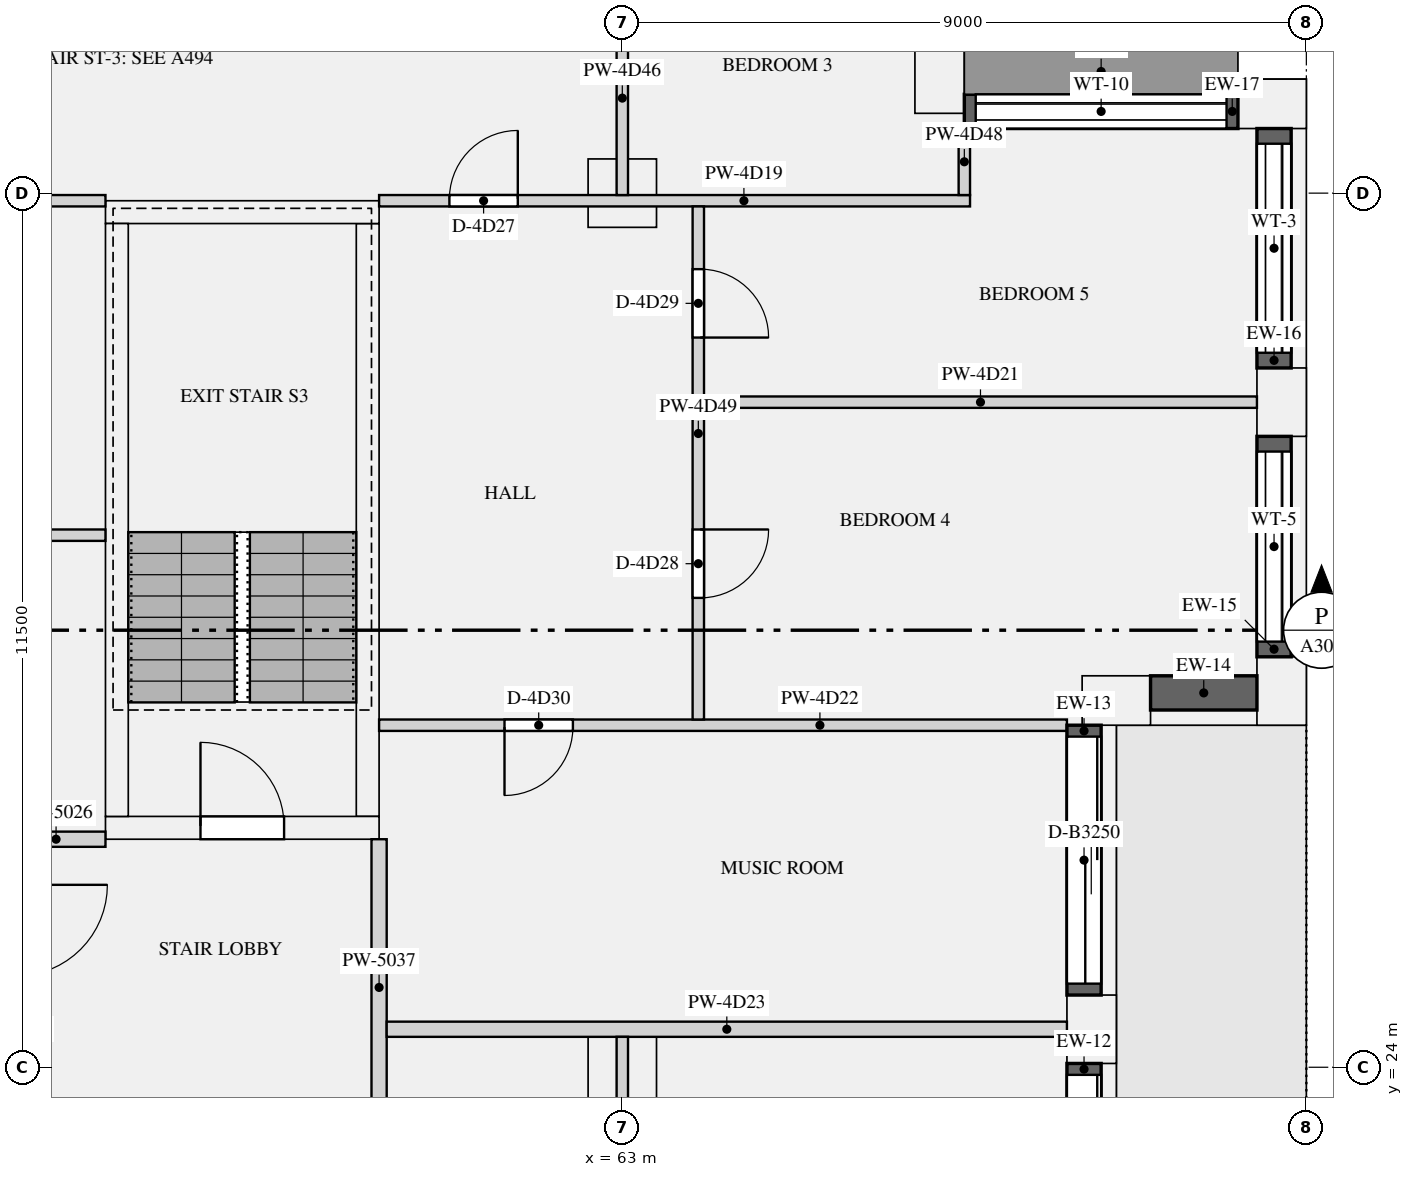
"""IFC4 building model, lengths in metres.
Left out: names, types, materials, properties, quantities, classifications, styles, units other than length and angle.
Written with IfcOpenShell. Run it as: python <this file> out.ifc"""

import sys

from ifc_helpers import new_model, si_unit, direction, frame, frame_2d, origin, origin_2d, place, context, subcontext, project, spatial, rectangle, extrude, element, fill, save


model = new_model("IFC4")
c1 = context("Model", 3, precision=1e-05, world=origin(), true_north=direction((0.0, 1.0)))
c2 = subcontext(c1, "Body", "Model", "MODEL_VIEW")
j1 = project(units=[si_unit("LENGTHUNIT", "METRE"), si_unit("PLANEANGLEUNIT", "RADIAN")], contexts=[c1])
p1 = place(None, origin())
s1 = spatial("IfcSite", under=j1, at=p1, CompositionType="ELEMENT")
p2 = place(p1, origin())
s2 = spatial("IfcBuilding", under=s1, at=p2, CompositionType="ELEMENT")
p3 = place(p2, frame((0.0, 0.0, 223.2)))
s3 = spatial("IfcBuildingStorey", under=s2, at=p3, CompositionType="ELEMENT", Elevation=223.2)
for number, where, z_axis, x_axis in (
    (1, (69.175, 24.5, 0.0), (0.0, 0.0, 1.0), (0.0, 1.0, 0.0)),
    (2, (69.5, 28.825, 0.0), (0.0, 0.0, 1.0), (1.0, 0.0, 0.0)),
    (3, (71.675, 28.95, 0.0), (0.0, 0.0, 1.0), (0.0, 1.0, 0.0)),
    (4, (71.675, 32.75, 0.0), (0.0, 0.0, 1.0), (0.0, 1.0, 0.0)),
    (5, (71.55, 36.675, 0.0), (0.0, 0.0, 1.0), (-1.0, 0.0, 0.0)),
    (6, (67.175, 37.0, 0.0), (0.0, 0.0, 1.0), (0.0, 1.0, 0.0)),
):
    element("IfcColumn", number, at=place(p3, frame(where, z_axis=z_axis, x_axis=x_axis)), inside=s3, PredefinedType="USERDEFINED", context=c2, shape_type="SweptSolid", body=[
        extrude(rectangle(XDim=0.9, YDim=0.65, at=origin_2d()), origin(), (0.0, 0.0, 1.0), 3.15),
    ])
for number, where, z_axis, x_axis in (
    (7, (63.0, 24.0, 0.0), (0.0, 0.0, 1.0), (1.0, 0.0, 0.0)),
    (8, (63.0, 35.5, 0.0), (0.0, 0.0, 1.0), (1.0, 0.0, 0.0)),
):
    element("IfcColumn", number, at=place(p3, frame(where, z_axis=z_axis, x_axis=x_axis)), inside=s3, PredefinedType="COLUMN", context=c2, shape_type="SweptSolid", body=[
        extrude(rectangle(XDim=0.9, YDim=0.9, at=origin_2d()), origin(), (0.0, 0.0, 1.0), 3.15),
    ])
p4 = place(p3, frame((56.2, 27.15, 0.0), z_axis=(0.0, 0.0, 1.0), x_axis=(1.0, 0.0, 0.0)))
e9 = element("IfcWall", 9, at=p4, inside=s3, PredefinedType="SHEAR", context=c2, shape_type="SweptSolid", body=[
    extrude(rectangle(XDim=3.6, YDim=0.3, at=frame_2d((1.8, 0.0))), origin(), (0.0, 0.0, 1.0), 3.15),
])
p5 = place(p4, frame((1.25, 0.0, 0.0)))
e10 = element("IfcOpeningElement", 10, at=p5, cuts=e9, PredefinedType="OPENING", context=c2, shape_type="SweptSolid", body=[
    extrude(rectangle(XDim=1.1, YDim=2.1, at=frame_2d((0.55, 1.05))), frame((0.0, 0.16, 0.0), z_axis=(0.0, -1.0, 0.0), x_axis=(1.0, 0.0, 0.0)), (0.0, 0.0, 1.0), 0.32),
])
p6 = place(p3, frame((56.2, 35.25, 0.0), z_axis=(0.0, 0.0, 1.0), x_axis=(1.0, 0.0, 0.0)))
e11 = element("IfcWall", 11, at=p6, inside=s3, PredefinedType="SHEAR", context=c2, shape_type="SweptSolid", body=[
    extrude(rectangle(XDim=3.6, YDim=0.3, at=frame_2d((1.8, 0.0))), origin(), (0.0, 0.0, 1.0), 3.15),
])
for number, where, z_axis, x_axis in (
    (12, (56.35, 27.3, 0.0), (0.0, 0.0, 1.0), (0.0, 1.0, 0.0)),
    (13, (59.65, 27.3, 0.0), (0.0, 0.0, 1.0), (0.0, 1.0, 0.0)),
):
    element("IfcWall", number, at=place(p3, frame(where, z_axis=z_axis, x_axis=x_axis)), inside=s3, PredefinedType="SHEAR", context=c2, shape_type="SweptSolid", body=[
        extrude(rectangle(XDim=7.8, YDim=0.3, at=frame_2d((3.9, 0.0))), origin(), (0.0, 0.0, 1.0), 3.15),
    ])
p7 = place(p3, frame((69.075, 20.95, 0.0), z_axis=(0.0, 0.0, 1.0), x_axis=(0.0, 1.0, 0.0)))
e14 = element("IfcWall", 14, at=p7, inside=s3, PredefinedType="SOLIDWALL", context=c2, shape_type="SweptSolid", body=[
    extrude(rectangle(XDim=3.1, YDim=0.45, at=frame_2d((1.55, 0.0))), origin(), (0.0, 0.0, 1.0), 2.83),
])
p8 = place(p7, frame((0.15, 0.0, 0.0)))
e15 = element("IfcOpeningElement", 15, at=p8, cuts=e14, PredefinedType="OPENING", context=c2, shape_type="SweptSolid", body=[
    extrude(rectangle(XDim=2.8, YDim=2.3, at=frame_2d((1.4, 1.15))), frame((0.0, 0.235, 0.0), z_axis=(0.0, -1.0, 0.0), x_axis=(1.0, 0.0, 0.0)), (0.0, 0.0, 1.0), 0.47),
])
p9 = place(p3, frame((69.075, 24.95, 0.0), z_axis=(0.0, 0.0, 1.0), x_axis=(0.0, 1.0, 0.0)))
e16 = element("IfcWall", 16, at=p9, inside=s3, PredefinedType="SOLIDWALL", context=c2, shape_type="SweptSolid", body=[
    extrude(rectangle(XDim=3.55, YDim=0.45, at=frame_2d((1.775, 0.0))), origin(), (0.0, 0.0, 1.0), 2.83),
])
p10 = place(p9, frame((0.15, 0.0, 0.0)))
e17 = element("IfcOpeningElement", 17, at=p10, cuts=e16, PredefinedType="OPENING", context=c2, shape_type="SweptSolid", body=[
    extrude(rectangle(XDim=3.25, YDim=2.3, at=frame_2d((1.625, 1.15))), frame((0.0, 0.235, 0.0), z_axis=(0.0, -1.0, 0.0), x_axis=(1.0, 0.0, 0.0)), (0.0, 0.0, 1.0), 0.47),
])
p11 = place(p3, frame((69.95, 28.925, 0.9), z_axis=(0.0, 0.0, 1.0), x_axis=(1.0, 0.0, 0.0)))
e18 = element("IfcWall", 18, at=p11, inside=s3, PredefinedType="SOLIDWALL", context=c2, shape_type="SweptSolid", body=[
    extrude(rectangle(XDim=1.4, YDim=0.45, at=frame_2d((0.7, 0.0))), origin(), (0.0, 0.0, 1.0), 1.93),
])
p12 = place(p3, frame((71.575, 29.4, 0.9), z_axis=(0.0, 0.0, 1.0), x_axis=(0.0, 1.0, 0.0)))
e19 = element("IfcWall", 19, at=p12, inside=s3, PredefinedType="SOLIDWALL", context=c2, shape_type="SweptSolid", body=[
    extrude(rectangle(XDim=2.9, YDim=0.45, at=frame_2d((1.45, 0.0))), origin(), (0.0, 0.0, 1.0), 1.93),
])
p13 = place(p12, frame((0.2, 0.0, 0.15)))
e20 = element("IfcOpeningElement", 20, at=p13, cuts=e19, PredefinedType="OPENING", context=c2, shape_type="SweptSolid", body=[
    extrude(rectangle(XDim=2.5, YDim=1.5, at=frame_2d((1.25, 0.75))), frame((0.0, 0.235, 0.0), z_axis=(0.0, -1.0, 0.0), x_axis=(1.0, 0.0, 0.0)), (0.0, 0.0, 1.0), 0.47),
])
p14 = place(p3, frame((71.575, 33.2, 0.9), z_axis=(0.0, 0.0, 1.0), x_axis=(0.0, 1.0, 0.0)))
e21 = element("IfcWall", 21, at=p14, inside=s3, PredefinedType="SOLIDWALL", context=c2, shape_type="SweptSolid", body=[
    extrude(rectangle(XDim=3.15, YDim=0.45, at=frame_2d((1.575, 0.0))), origin(), (0.0, 0.0, 1.0), 1.93),
])
p15 = place(p14, frame((0.2, 0.0, 0.15)))
e22 = element("IfcOpeningElement", 22, at=p15, cuts=e21, PredefinedType="OPENING", context=c2, shape_type="SweptSolid", body=[
    extrude(rectangle(XDim=2.75, YDim=1.5, at=frame_2d((1.375, 0.75))), frame((0.0, 0.235, 0.0), z_axis=(0.0, -1.0, 0.0), x_axis=(1.0, 0.0, 0.0)), (0.0, 0.0, 1.0), 0.47),
])
p16 = place(p3, frame((71.1, 36.575, 0.9), z_axis=(0.0, 0.0, 1.0), x_axis=(-1.0, 0.0, 0.0)))
e23 = element("IfcWall", 23, at=p16, inside=s3, PredefinedType="SOLIDWALL", context=c2, shape_type="SweptSolid", body=[
    extrude(rectangle(XDim=3.6, YDim=0.45, at=frame_2d((1.8, 0.0))), origin(), (0.0, 0.0, 1.0), 1.93),
])
p17 = place(p16, frame((0.15, 0.0, 0.15)))
e24 = element("IfcOpeningElement", 24, at=p17, cuts=e23, PredefinedType="OPENING", context=c2, shape_type="SweptSolid", body=[
    extrude(rectangle(XDim=3.3, YDim=1.5, at=frame_2d((1.65, 0.75))), frame((0.0, 0.235, 0.0), z_axis=(0.0, -1.0, 0.0), x_axis=(1.0, 0.0, 0.0)), (0.0, 0.0, 1.0), 0.47),
])
p18 = place(p3, frame((54.9, 27.0, 0.0), z_axis=(0.0, 0.0, 1.0), x_axis=(1.0, 0.0, 0.0)))
e25 = element("IfcWall", 25, at=p18, inside=s3, PredefinedType="PARTITIONING", context=c2, shape_type="SweptSolid", body=[
    extrude(rectangle(XDim=1.3, YDim=0.2, at=frame_2d((0.65, 0.0))), origin(), (0.0, 0.0, 1.0), 2.83),
])
p19 = place(p3, frame((59.8, 23.1, 0.0), z_axis=(0.0, 0.0, 1.0), x_axis=(0.0, 1.0, 0.0)))
e26 = element("IfcWall", 26, at=p19, inside=s3, PredefinedType="PARTITIONING", context=c2, shape_type="SweptSolid", body=[
    extrude(rectangle(XDim=3.9, YDim=0.2, at=frame_2d((1.95, 0.0))), origin(), (0.0, 0.0, 1.0), 2.83),
])
p20 = place(p3, frame((48.075, 31.0, 0.0), z_axis=(0.0, 0.0, 1.0), x_axis=(1.0, 0.0, 0.0)))
e27 = element("IfcWall", 27, at=p20, inside=s3, PredefinedType="PARTITIONING", context=c2, shape_type="SweptSolid", body=[
    extrude(rectangle(XDim=8.125, YDim=0.15, at=frame_2d((4.062, 0.0))), origin(), (0.0, 0.0, 1.0), 2.83),
])
p21 = place(p20, frame((3.575, 0.0, 0.0)))
e28 = element("IfcOpeningElement", 28, at=p21, cuts=e27, PredefinedType="OPENING", context=c2, shape_type="SweptSolid", body=[
    extrude(rectangle(XDim=0.9, YDim=2.1, at=frame_2d((0.45, 1.05))), frame((0.0, 0.085, 0.0), z_axis=(0.0, -1.0, 0.0), x_axis=(1.0, 0.0, 0.0)), (0.0, 0.0, 1.0), 0.17),
])
p22 = place(p3, frame((45.0, 35.4, 0.0), z_axis=(0.0, 0.0, 1.0), x_axis=(1.0, 0.0, 0.0)))
e29 = element("IfcWall", 29, at=p22, inside=s3, PredefinedType="PARTITIONING", context=c2, shape_type="SweptSolid", body=[
    extrude(rectangle(XDim=11.2, YDim=0.15, at=frame_2d((5.6, 0.0))), origin(), (0.0, 0.0, 1.0), 2.83),
])
p23 = place(p22, frame((5.325, 0.0, 0.0)))
e30 = element("IfcOpeningElement", 30, at=p23, cuts=e29, PredefinedType="OPENING", context=c2, shape_type="SweptSolid", body=[
    extrude(rectangle(XDim=0.9, YDim=2.1, at=frame_2d((0.45, 1.05))), frame((0.0, 0.085, 0.0), z_axis=(0.0, -1.0, 0.0), x_axis=(1.0, 0.0, 0.0)), (0.0, 0.0, 1.0), 0.17),
])
p24 = place(p22, frame((0.975, 0.0, 0.0)))
e31 = element("IfcOpeningElement", 31, at=p24, cuts=e29, PredefinedType="OPENING", context=c2, shape_type="SweptSolid", body=[
    extrude(rectangle(XDim=1.5, YDim=2.1, at=frame_2d((0.75, 1.05))), frame((0.0, 0.085, 0.0), z_axis=(0.0, -1.0, 0.0), x_axis=(1.0, 0.0, 0.0)), (0.0, 0.0, 1.0), 0.17),
])
p25 = place(p3, frame((59.8, 35.4, 0.0), z_axis=(0.0, 0.0, 1.0), x_axis=(1.0, 0.0, 0.0)))
e32 = element("IfcWall", 32, at=p25, inside=s3, PredefinedType="PARTITIONING", context=c2, shape_type="SweptSolid", body=[
    extrude(rectangle(XDim=7.775, YDim=0.15, at=frame_2d((3.887, 0.0))), origin(), (0.0, 0.0, 1.0), 2.83),
])
p26 = place(p25, frame((0.925, 0.0, 0.0)))
e33 = element("IfcOpeningElement", 33, at=p26, cuts=e32, PredefinedType="OPENING", context=c2, shape_type="SweptSolid", body=[
    extrude(rectangle(XDim=0.9, YDim=2.1, at=frame_2d((0.45, 1.05))), frame((0.0, 0.085, 0.0), z_axis=(0.0, -1.0, 0.0), x_axis=(1.0, 0.0, 0.0)), (0.0, 0.0, 1.0), 0.17),
])
p27 = place(p3, frame((64.075, 32.75, 0.0), z_axis=(0.0, 0.0, 1.0), x_axis=(1.0, 0.0, 0.0)))
e34 = element("IfcWall", 34, at=p27, inside=s3, PredefinedType="PARTITIONING", context=c2, shape_type="SweptSolid", body=[
    extrude(rectangle(XDim=7.275, YDim=0.15, at=frame_2d((3.638, 0.0))), origin(), (0.0, 0.0, 1.0), 2.83),
])
p28 = place(p3, frame((59.8, 28.5, 0.0), z_axis=(0.0, 0.0, 1.0), x_axis=(1.0, 0.0, 0.0)))
e35 = element("IfcWall", 35, at=p28, inside=s3, PredefinedType="PARTITIONING", context=c2, shape_type="SweptSolid", body=[
    extrude(rectangle(XDim=9.05, YDim=0.15, at=frame_2d((4.525, 0.0))), origin(), (0.0, 0.0, 1.0), 2.83),
])
p29 = place(p28, frame((1.65, 0.0, 0.0)))
e36 = element("IfcOpeningElement", 36, at=p29, cuts=e35, PredefinedType="OPENING", context=c2, shape_type="SweptSolid", body=[
    extrude(rectangle(XDim=0.9, YDim=2.1, at=frame_2d((0.45, 1.05))), frame((0.0, 0.085, 0.0), z_axis=(0.0, -1.0, 0.0), x_axis=(1.0, 0.0, 0.0)), (0.0, 0.0, 1.0), 0.17),
])
p30 = place(p3, frame((59.9, 24.5, 0.0), z_axis=(0.0, 0.0, 1.0), x_axis=(1.0, 0.0, 0.0)))
e37 = element("IfcWall", 37, at=p30, inside=s3, PredefinedType="PARTITIONING", context=c2, shape_type="SweptSolid", body=[
    extrude(rectangle(XDim=8.95, YDim=0.2, at=frame_2d((4.475, 0.0))), origin(), (0.0, 0.0, 1.0), 2.83),
])
p31 = place(p3, frame((63.0, 0.65, 0.0), z_axis=(0.0, 0.0, 1.0), x_axis=(0.0, 1.0, 0.0)))
e38 = element("IfcWall", 38, at=p31, inside=s3, PredefinedType="PARTITIONING", context=c2, shape_type="SweptSolid", body=[
    extrude(rectangle(XDim=23.75, YDim=0.15, at=frame_2d((11.875, 0.0))), origin(), (0.0, 0.0, 1.0), 2.83),
])
p32 = place(p31, frame((6.4, 0.0, 0.0)))
e39 = element("IfcOpeningElement", 39, at=p32, cuts=e38, PredefinedType="OPENING", context=c2, shape_type="SweptSolid", body=[
    extrude(rectangle(XDim=0.9, YDim=2.1, at=frame_2d((0.45, 1.05))), frame((0.0, 0.085, 0.0), z_axis=(0.0, -1.0, 0.0), x_axis=(1.0, 0.0, 0.0)), (0.0, 0.0, 1.0), 0.17),
])
p33 = place(p31, frame((17.625, 0.0, 0.0)))
e40 = element("IfcOpeningElement", 40, at=p33, cuts=e38, PredefinedType="OPENING", context=c2, shape_type="SweptSolid", body=[
    extrude(rectangle(XDim=1.5, YDim=2.1, at=frame_2d((0.75, 1.05))), frame((0.0, 0.085, 0.0), z_axis=(0.0, -1.0, 0.0), x_axis=(1.0, 0.0, 0.0)), (0.0, 0.0, 1.0), 0.17),
])
p34 = place(p3, frame((63.0, 35.475, 0.0), z_axis=(0.0, 0.0, 1.0), x_axis=(0.0, 1.0, 0.0)))
e41 = element("IfcWall", 41, at=p34, inside=s3, PredefinedType="PARTITIONING", context=c2, shape_type="SweptSolid", body=[
    extrude(rectangle(XDim=5.375, YDim=0.15, at=frame_2d((2.688, 0.0))), origin(), (0.0, 0.0, 1.0), 2.83),
])
p35 = place(p34, frame((2.55, 0.0, 0.0)))
e42 = element("IfcOpeningElement", 42, at=p35, cuts=e41, PredefinedType="OPENING", context=c2, shape_type="SweptSolid", body=[
    extrude(rectangle(XDim=0.9, YDim=2.1, at=frame_2d((0.45, 1.05))), frame((0.0, 0.085, 0.0), z_axis=(0.0, -1.0, 0.0), x_axis=(1.0, 0.0, 0.0)), (0.0, 0.0, 1.0), 0.17),
])
p36 = place(p3, frame((67.5, 35.475, 0.0), z_axis=(0.0, 0.0, 1.0), x_axis=(0.0, 1.0, 0.0)))
e43 = element("IfcWall", 43, at=p36, inside=s3, PredefinedType="PARTITIONING", context=c2, shape_type="SweptSolid", body=[
    extrude(rectangle(XDim=0.875, YDim=0.15, at=frame_2d((0.438, 0.0))), origin(), (0.0, 0.0, 1.0), 2.83),
])
p37 = place(p3, frame((64.0, 28.575, 0.0), z_axis=(0.0, 0.0, 1.0), x_axis=(0.0, 1.0, 0.0)))
e44 = element("IfcWall", 44, at=p37, inside=s3, PredefinedType="PARTITIONING", context=c2, shape_type="SweptSolid", body=[
    extrude(rectangle(XDim=6.75, YDim=0.15, at=frame_2d((3.375, 0.0))), origin(), (0.0, 0.0, 1.0), 2.83),
])
p38 = place(p37, frame((1.6, 0.0, 0.0)))
e45 = element("IfcOpeningElement", 45, at=p38, cuts=e44, PredefinedType="OPENING", context=c2, shape_type="SweptSolid", body=[
    extrude(rectangle(XDim=0.9, YDim=2.1, at=frame_2d((0.45, 1.05))), frame((0.0, 0.085, 0.0), z_axis=(0.0, -1.0, 0.0), x_axis=(1.0, 0.0, 0.0)), (0.0, 0.0, 1.0), 0.17),
])
p39 = place(p37, frame((5.025, 0.0, 0.0)))
e46 = element("IfcOpeningElement", 46, at=p39, cuts=e44, PredefinedType="OPENING", context=c2, shape_type="SweptSolid", body=[
    extrude(rectangle(XDim=0.9, YDim=2.1, at=frame_2d((0.45, 1.05))), frame((0.0, 0.085, 0.0), z_axis=(0.0, -1.0, 0.0), x_axis=(1.0, 0.0, 0.0)), (0.0, 0.0, 1.0), 0.17),
])
p40 = place(p8, origin())
e47 = element("IfcDoor", 47, at=p40, inside=s3, OperationType="SLIDING_TO_LEFT", PredefinedType="DOOR", context=c2, shape_type="SweptSolid", body=[
    extrude(rectangle(XDim=2.8, YDim=2.3, at=frame_2d((1.4, 1.15))), frame((0.0, -0.07, 0.0), z_axis=(0.0, -1.0, 0.0), x_axis=(1.0, 0.0, 0.0)), (0.0, 0.0, 1.0), 0.05),
])
fill(e15, e47)
p41 = place(p10, origin())
e48 = element("IfcDoor", 48, at=p41, inside=s3, OperationType="SLIDING_TO_LEFT", PredefinedType="DOOR", context=c2, shape_type="SweptSolid", body=[
    extrude(rectangle(XDim=3.25, YDim=2.3, at=frame_2d((1.625, 1.15))), frame((0.0, -0.07, 0.0), z_axis=(0.0, -1.0, 0.0), x_axis=(1.0, 0.0, 0.0)), (0.0, 0.0, 1.0), 0.05),
])
fill(e17, e48)
p42 = place(p13, origin())
e49 = element("IfcWindow", 49, at=p42, inside=s3, PartitioningType="SINGLE_PANEL", PredefinedType="WINDOW", context=c2, shape_type="SweptSolid", body=[
    extrude(rectangle(XDim=2.5, YDim=1.5, at=frame_2d((1.25, 0.75))), frame((0.0, -0.065, 0.0), z_axis=(0.0, -1.0, 0.0), x_axis=(1.0, 0.0, 0.0)), (0.0, 0.0, 1.0), 0.06),
])
fill(e20, e49)
p43 = place(p15, origin())
e50 = element("IfcWindow", 50, at=p43, inside=s3, PartitioningType="SINGLE_PANEL", PredefinedType="WINDOW", context=c2, shape_type="SweptSolid", body=[
    extrude(rectangle(XDim=2.75, YDim=1.5, at=frame_2d((1.375, 0.75))), frame((0.0, -0.065, 0.0), z_axis=(0.0, -1.0, 0.0), x_axis=(1.0, 0.0, 0.0)), (0.0, 0.0, 1.0), 0.06),
])
fill(e22, e50)
p44 = place(p17, origin())
e51 = element("IfcWindow", 51, at=p44, inside=s3, PartitioningType="SINGLE_PANEL", PredefinedType="WINDOW", context=c2, shape_type="SweptSolid", body=[
    extrude(rectangle(XDim=3.3, YDim=1.5, at=frame_2d((1.65, 0.75))), frame((0.0, -0.065, 0.0), z_axis=(0.0, -1.0, 0.0), x_axis=(1.0, 0.0, 0.0)), (0.0, 0.0, 1.0), 0.06),
])
fill(e24, e51)
p45 = place(p5, origin())
e52 = element("IfcDoor", 52, at=p45, inside=s3, OperationType="SINGLE_SWING_LEFT", PredefinedType="DOOR", context=c2, shape_type="SweptSolid", body=[
    extrude(rectangle(XDim=1.1, YDim=2.1, at=frame_2d((0.55, 1.05))), frame((0.0, 0.025, 0.0), z_axis=(0.0, -1.0, 0.0), x_axis=(1.0, 0.0, 0.0)), (0.0, 0.0, 1.0), 0.05),
])
fill(e10, e52)
p46 = place(p26, origin())
e53 = element("IfcDoor", 53, at=p46, inside=s3, OperationType="SINGLE_SWING_RIGHT", PredefinedType="DOOR", context=c2, shape_type="SweptSolid", body=[
    extrude(rectangle(XDim=0.9, YDim=2.1, at=frame_2d((0.45, 1.05))), frame((0.0, 0.025, 0.0), z_axis=(0.0, -1.0, 0.0), x_axis=(1.0, 0.0, 0.0)), (0.0, 0.0, 1.0), 0.05),
])
fill(e33, e53)
p47 = place(p38, frame((0.9, 0.0, 0.0), z_axis=(0.0, 0.0, 1.0), x_axis=(-1.0, 0.0, 0.0)))
e54 = element("IfcDoor", 54, at=p47, inside=s3, OperationType="SINGLE_SWING_LEFT", PredefinedType="DOOR", context=c2, shape_type="SweptSolid", body=[
    extrude(rectangle(XDim=0.9, YDim=2.1, at=frame_2d((0.45, 1.05))), frame((0.0, 0.025, 0.0), z_axis=(0.0, -1.0, 0.0), x_axis=(1.0, 0.0, 0.0)), (0.0, 0.0, 1.0), 0.05),
])
fill(e45, e54)
p48 = place(p39, frame((0.9, 0.0, 0.0), z_axis=(0.0, 0.0, 1.0), x_axis=(-1.0, 0.0, 0.0)))
e55 = element("IfcDoor", 55, at=p48, inside=s3, OperationType="SINGLE_SWING_RIGHT", PredefinedType="DOOR", context=c2, shape_type="SweptSolid", body=[
    extrude(rectangle(XDim=0.9, YDim=2.1, at=frame_2d((0.45, 1.05))), frame((0.0, 0.025, 0.0), z_axis=(0.0, -1.0, 0.0), x_axis=(1.0, 0.0, 0.0)), (0.0, 0.0, 1.0), 0.05),
])
fill(e46, e55)
p49 = place(p29, frame((0.9, 0.0, 0.0), z_axis=(0.0, 0.0, 1.0), x_axis=(-1.0, 0.0, 0.0)))
e56 = element("IfcDoor", 56, at=p49, inside=s3, OperationType="SINGLE_SWING_RIGHT", PredefinedType="DOOR", context=c2, shape_type="SweptSolid", body=[
    extrude(rectangle(XDim=0.9, YDim=2.1, at=frame_2d((0.45, 1.05))), frame((0.0, 0.025, 0.0), z_axis=(0.0, -1.0, 0.0), x_axis=(1.0, 0.0, 0.0)), (0.0, 0.0, 1.0), 0.05),
])
fill(e36, e56)
save(model, sys.argv[1])
